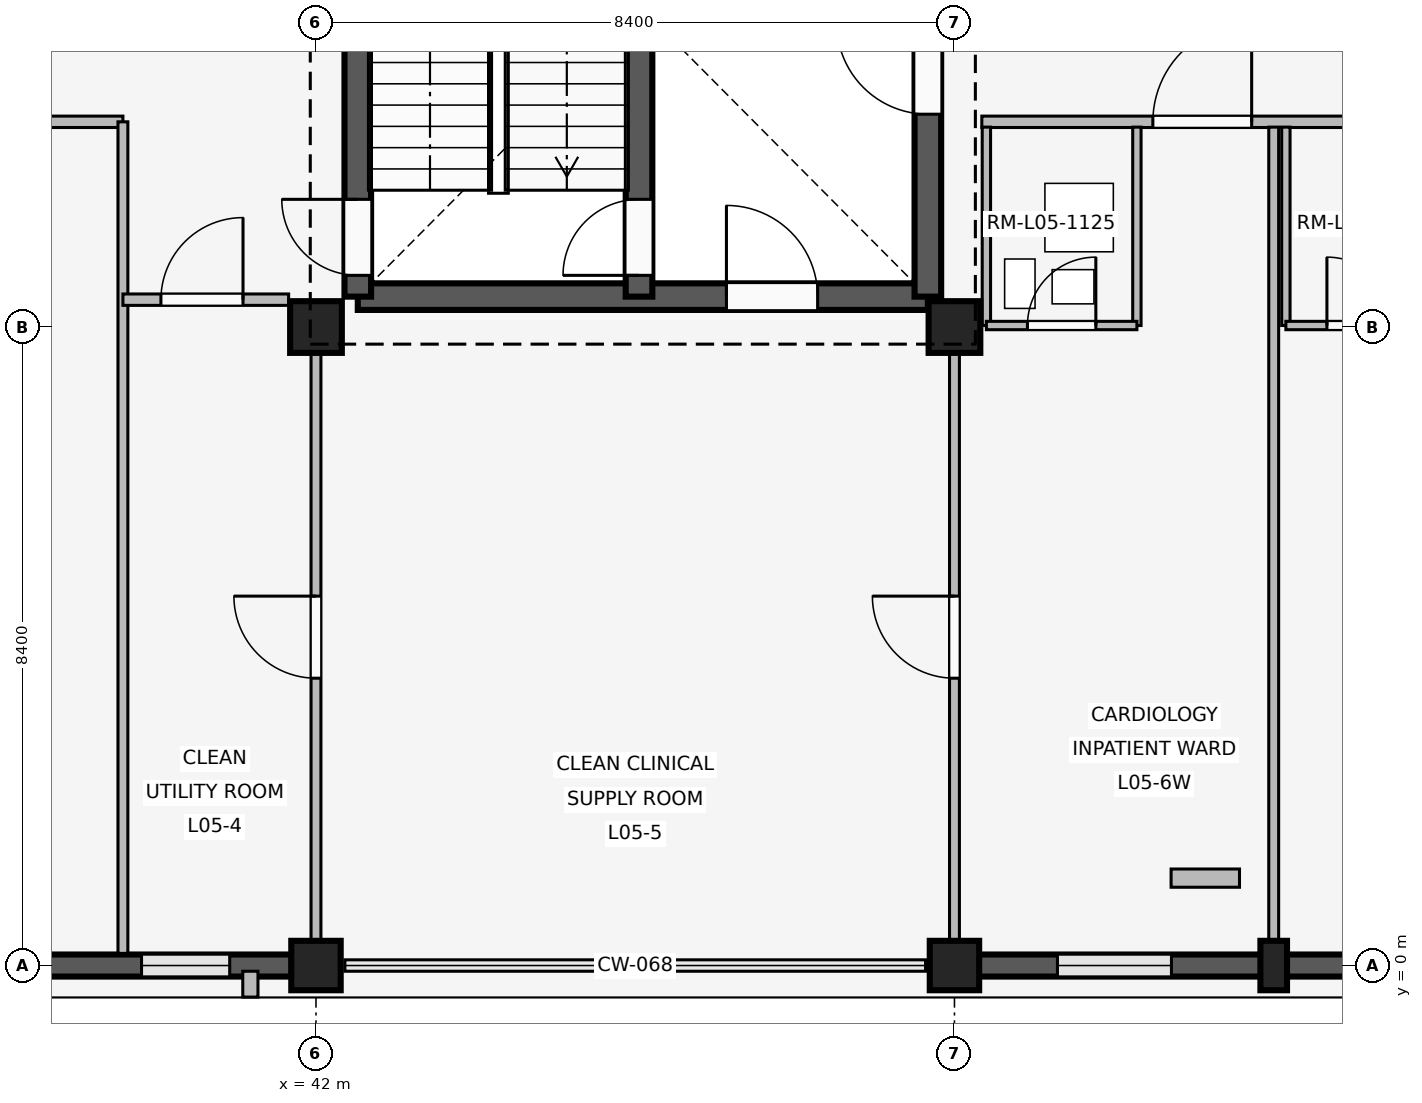
"""IFC4 building model, lengths in metres.
Left out: names, types, materials, properties, quantities, classifications, styles, units other than length and angle.
Written with IfcOpenShell. Run it as: python <this file> out.ifc"""

import sys

from ifc_helpers import new_model, si_unit, direction, frame, frame_2d, origin, origin_2d, place, context, subcontext, project, spatial, rectangle, extrude, element, fill, save


model = new_model("IFC4")
c1 = context("Model", 3, precision=1e-05, world=origin(), true_north=direction((0.0, 1.0)))
c2 = subcontext(c1, "Body", "Model", "MODEL_VIEW")
j1 = project(units=[si_unit("LENGTHUNIT", "METRE"), si_unit("PLANEANGLEUNIT", "RADIAN")], contexts=[c1])
p1 = place(None, origin())
s1 = spatial("IfcSite", under=j1, at=p1, CompositionType="ELEMENT")
p2 = place(p1, origin())
s2 = spatial("IfcBuilding", under=s1, at=p2, CompositionType="ELEMENT")
p3 = place(p2, frame((0.0, 0.0, 20.4)))
s3 = spatial("IfcBuildingStorey", under=s2, at=p3, CompositionType="ELEMENT", Elevation=20.4)
p4 = place(p3, frame((42.0, 0.0, 0.0), z_axis=(0.0, 0.0, 1.0), x_axis=(1.0, 0.0, 0.0)))
e1 = element("IfcColumn", 1, at=p4, inside=s3, PredefinedType="COLUMN", context=c2, shape_type="SweptSolid", body=[
    extrude(rectangle(XDim=0.65, YDim=0.65, at=origin_2d()), origin(), (0.0, 0.0, 1.0), 4.2),
])
p5 = place(p3, frame((42.0, 8.4, 0.0), z_axis=(0.0, 0.0, 1.0), x_axis=(1.0, 0.0, 0.0)))
e2 = element("IfcColumn", 2, at=p5, inside=s3, PredefinedType="COLUMN", context=c2, shape_type="SweptSolid", body=[
    extrude(rectangle(XDim=0.68, YDim=0.68, at=origin_2d()), origin(), (0.0, 0.0, 1.0), 4.2),
])
p6 = place(p3, frame((50.4, 0.0, 0.0), z_axis=(0.0, 0.0, 1.0), x_axis=(1.0, 0.0, 0.0)))
e3 = element("IfcColumn", 3, at=p6, inside=s3, PredefinedType="COLUMN", context=c2, shape_type="SweptSolid", body=[
    extrude(rectangle(XDim=0.65, YDim=0.65, at=origin_2d()), origin(), (0.0, 0.0, 1.0), 4.2),
])
p7 = place(p3, frame((50.4, 8.4, 0.0), z_axis=(0.0, 0.0, 1.0), x_axis=(1.0, 0.0, 0.0)))
e4 = element("IfcColumn", 4, at=p7, inside=s3, PredefinedType="COLUMN", context=c2, shape_type="SweptSolid", body=[
    extrude(rectangle(XDim=0.68, YDim=0.68, at=origin_2d()), origin(), (0.0, 0.0, 1.0), 4.2),
])
p8 = place(p3, frame((54.6, 0.0, 0.0), z_axis=(0.0, 0.0, 1.0), x_axis=(1.0, 0.0, 0.0)))
e5 = element("IfcColumn", 5, at=p8, inside=s3, PredefinedType="PILASTER", context=c2, shape_type="SweptSolid", body=[
    extrude(rectangle(XDim=0.35, YDim=0.65, at=origin_2d()), origin(), (0.0, 0.0, 1.0), 4.2),
])
p9 = place(p3, frame((41.68, 0.0, 0.0), z_axis=(0.0, 0.0, 1.0), x_axis=(-1.0, 0.0, 0.0)))
e6 = element("IfcWall", 6, at=p9, inside=s3, PredefinedType="SOLIDWALL", context=c2, shape_type="SweptSolid", body=[
    extrude(rectangle(XDim=7.76, YDim=0.29, at=frame_2d((3.88, 0.0))), origin(), (0.0, 0.0, 1.0), 3.34),
])
p10 = place(p9, frame((0.815, 0.0, 0.85)))
e7 = element("IfcOpeningElement", 7, at=p10, cuts=e6, PredefinedType="OPENING", context=c2, shape_type="SweptSolid", body=[
    extrude(rectangle(XDim=1.16, YDim=1.48, at=frame_2d((0.58, 0.74))), frame((0.0, 0.155, 0.0), z_axis=(0.0, -1.0, 0.0), x_axis=(1.0, 0.0, 0.0)), (0.0, 0.0, 1.0), 0.31),
])
p11 = place(p9, frame((5.395, 0.0, 0.85)))
e8 = element("IfcOpeningElement", 8, at=p11, cuts=e6, PredefinedType="OPENING", context=c2, shape_type="SweptSolid", body=[
    extrude(rectangle(XDim=1.16, YDim=1.48, at=frame_2d((0.58, 0.74))), frame((0.0, 0.155, 0.0), z_axis=(0.0, -1.0, 0.0), x_axis=(1.0, 0.0, 0.0)), (0.0, 0.0, 1.0), 0.31),
])
p12 = place(p3, frame((41.137, -0.075, 0.0), z_axis=(0.0, 0.0, 1.0), x_axis=(0.0, -1.0, 0.0)))
e9 = element("IfcWall", 9, at=p12, inside=s3, PredefinedType="ELEMENTEDWALL", context=c2, shape_type="SweptSolid", body=[
    extrude(rectangle(XDim=0.34, YDim=0.2, at=frame_2d((0.17, 0.0))), origin(), (0.0, 0.0, 1.0), 3.32),
])
p13 = place(p3, frame((58.48, 0.0, 0.0), z_axis=(0.0, 0.0, 1.0), x_axis=(-1.0, 0.0, 0.0)))
e10 = element("IfcWall", 10, at=p13, inside=s3, PredefinedType="SOLIDWALL", context=c2, shape_type="SweptSolid", body=[
    extrude(rectangle(XDim=7.76, YDim=0.29, at=frame_2d((3.88, 0.0))), origin(), (0.0, 0.0, 1.0), 3.34),
])
p14 = place(p13, frame((1.035, 0.0, 0.85)))
e11 = element("IfcOpeningElement", 11, at=p14, cuts=e10, PredefinedType="OPENING", context=c2, shape_type="SweptSolid", body=[
    extrude(rectangle(XDim=1.5, YDim=1.55, at=frame_2d((0.75, 0.775))), frame((0.0, 0.155, 0.0), z_axis=(0.0, -1.0, 0.0), x_axis=(1.0, 0.0, 0.0)), (0.0, 0.0, 1.0), 0.31),
])
p15 = place(p13, frame((5.225, 0.0, 0.85)))
e12 = element("IfcOpeningElement", 12, at=p15, cuts=e10, PredefinedType="OPENING", context=c2, shape_type="SweptSolid", body=[
    extrude(rectangle(XDim=1.5, YDim=1.55, at=frame_2d((0.75, 0.775))), frame((0.0, 0.155, 0.0), z_axis=(0.0, -1.0, 0.0), x_axis=(1.0, 0.0, 0.0)), (0.0, 0.0, 1.0), 0.31),
])
p16 = place(p3, frame((42.55, 8.8, 0.0), z_axis=(0.0, 0.0, 1.0), x_axis=(1.0, 0.0, 0.0)))
e13 = element("IfcWall", 13, at=p16, inside=s3, PredefinedType="SHEAR", context=c2, shape_type="SweptSolid", body=[
    extrude(rectangle(XDim=7.5, YDim=0.35, at=frame_2d((3.75, 0.0))), origin(), (0.0, 0.0, 1.0), 3.92),
])
p17 = place(p16, frame((4.85, 0.0, 0.0)))
e14 = element("IfcOpeningElement", 14, at=p17, cuts=e13, PredefinedType="OPENING", context=c2, shape_type="SweptSolid", body=[
    extrude(rectangle(XDim=1.2, YDim=2.2, at=frame_2d((0.6, 1.1))), frame((0.0, 0.185, 0.0), z_axis=(0.0, -1.0, 0.0), x_axis=(1.0, 0.0, 0.0)), (0.0, 0.0, 1.0), 0.37),
])
p18 = place(p3, frame((42.55, 8.8, 0.0), z_axis=(0.0, 0.0, 1.0), x_axis=(0.0, 1.0, 0.0)))
e15 = element("IfcWall", 15, at=p18, inside=s3, PredefinedType="SHEAR", context=c2, shape_type="SweptSolid", body=[
    extrude(rectangle(XDim=7.55, YDim=0.35, at=frame_2d((3.775, 0.0))), origin(), (0.0, 0.0, 1.0), 3.92),
])
p19 = place(p18, frame((0.28, 0.0, 0.0)))
e16 = element("IfcOpeningElement", 16, at=p19, cuts=e15, PredefinedType="OPENING", context=c2, shape_type="SweptSolid", body=[
    extrude(rectangle(XDim=1.0, YDim=2.15, at=frame_2d((0.5, 1.075))), frame((0.0, 0.185, 0.0), z_axis=(0.0, -1.0, 0.0), x_axis=(1.0, 0.0, 0.0)), (0.0, 0.0, 1.0), 0.37),
])
p20 = place(p3, frame((50.05, 8.8, 0.0), z_axis=(0.0, 0.0, 1.0), x_axis=(0.0, 1.0, 0.0)))
e17 = element("IfcWall", 17, at=p20, inside=s3, PredefinedType="SHEAR", context=c2, shape_type="SweptSolid", body=[
    extrude(rectangle(XDim=7.55, YDim=0.35, at=frame_2d((3.775, 0.0))), origin(), (0.0, 0.0, 1.0), 3.92),
])
p21 = place(p20, frame((2.4, 0.0, 0.0)))
e18 = element("IfcOpeningElement", 18, at=p21, cuts=e17, PredefinedType="OPENING", context=c2, shape_type="SweptSolid", body=[
    extrude(rectangle(XDim=1.2, YDim=2.2, at=frame_2d((0.6, 1.1))), frame((0.0, 0.185, 0.0), z_axis=(0.0, -1.0, 0.0), x_axis=(1.0, 0.0, 0.0)), (0.0, 0.0, 1.0), 0.37),
])
p22 = place(p3, frame((46.25, 8.8, 0.0), z_axis=(0.0, 0.0, 1.0), x_axis=(0.0, 1.0, 0.0)))
e19 = element("IfcWall", 19, at=p22, inside=s3, PredefinedType="SHEAR", context=c2, shape_type="SweptSolid", body=[
    extrude(rectangle(XDim=7.55, YDim=0.35, at=frame_2d((3.775, 0.0))), origin(), (0.0, 0.0, 1.0), 3.92),
])
p23 = place(p22, frame((0.28, 0.0, 0.0)))
e20 = element("IfcOpeningElement", 20, at=p23, cuts=e19, PredefinedType="OPENING", context=c2, shape_type="SweptSolid", body=[
    extrude(rectangle(XDim=1.0, YDim=2.15, at=frame_2d((0.5, 1.075))), frame((0.0, 0.185, 0.0), z_axis=(0.0, -1.0, 0.0), x_axis=(1.0, 0.0, 0.0)), (0.0, 0.0, 1.0), 0.37),
])
p24 = place(p3, frame((33.68, 11.1, 0.0), z_axis=(0.0, 0.0, 1.0), x_axis=(1.0, 0.0, 0.0)))
e21 = element("IfcWall", 21, at=p24, inside=s3, PredefinedType="PARTITIONING", context=c2, shape_type="SweptSolid", body=[
    extrude(rectangle(XDim=5.78, YDim=0.15, at=frame_2d((2.89, 0.0))), origin(), (0.0, 0.0, 1.0), 3.32),
])
p25 = place(p24, frame((2.38, 0.0, 0.0)))
e22 = element("IfcOpeningElement", 22, at=p25, cuts=e21, PredefinedType="OPENING", context=c2, shape_type="SweptSolid", body=[
    extrude(rectangle(XDim=1.25, YDim=2.2, at=frame_2d((0.625, 1.1))), frame((0.0, 0.085, 0.0), z_axis=(0.0, -1.0, 0.0), x_axis=(1.0, 0.0, 0.0)), (0.0, 0.0, 1.0), 0.17),
])
p26 = place(p3, frame((39.46, 0.16, 0.0), z_axis=(0.0, 0.0, 1.0), x_axis=(0.0, 1.0, 0.0)))
e23 = element("IfcWall", 23, at=p26, inside=s3, PredefinedType="PARTITIONING", context=c2, shape_type="SweptSolid", body=[
    extrude(rectangle(XDim=10.94, YDim=0.13, at=frame_2d((5.47, 0.0))), origin(), (0.0, 0.0, 1.0), 3.32),
])
p27 = place(p3, frame((39.46, 8.76, 0.0), z_axis=(0.0, 0.0, 1.0), x_axis=(1.0, 0.0, 0.0)))
e24 = element("IfcWall", 24, at=p27, inside=s3, PredefinedType="PARTITIONING", context=c2, shape_type="SweptSolid", body=[
    extrude(rectangle(XDim=2.18, YDim=0.15, at=frame_2d((1.09, 0.0))), origin(), (0.0, 0.0, 1.0), 3.32),
])
p28 = place(p27, frame((0.5, 0.0, 0.0)))
e25 = element("IfcOpeningElement", 25, at=p28, cuts=e24, PredefinedType="OPENING", context=c2, shape_type="SweptSolid", body=[
    extrude(rectangle(XDim=1.08, YDim=2.15, at=frame_2d((0.54, 1.075))), frame((0.0, 0.085, 0.0), z_axis=(0.0, -1.0, 0.0), x_axis=(1.0, 0.0, 0.0)), (0.0, 0.0, 1.0), 0.17),
])
p29 = place(p3, frame((42.0, 0.14, 0.0), z_axis=(0.0, 0.0, 1.0), x_axis=(0.0, 1.0, 0.0)))
e26 = element("IfcWall", 26, at=p29, inside=s3, PredefinedType="PARTITIONING", context=c2, shape_type="SweptSolid", body=[
    extrude(rectangle(XDim=8.21, YDim=0.13, at=frame_2d((4.105, 0.0))), origin(), (0.0, 0.0, 1.0), 3.32),
])
p30 = place(p29, frame((3.64, 0.0, 0.0)))
e27 = element("IfcOpeningElement", 27, at=p30, cuts=e26, PredefinedType="OPENING", context=c2, shape_type="SweptSolid", body=[
    extrude(rectangle(XDim=1.08, YDim=2.15, at=frame_2d((0.54, 1.075))), frame((0.0, 0.075, 0.0), z_axis=(0.0, -1.0, 0.0), x_axis=(1.0, 0.0, 0.0)), (0.0, 0.0, 1.0), 0.15),
])
p31 = place(p3, frame((50.4, 0.14, 0.0), z_axis=(0.0, 0.0, 1.0), x_axis=(0.0, 1.0, 0.0)))
e28 = element("IfcWall", 28, at=p31, inside=s3, PredefinedType="PARTITIONING", context=c2, shape_type="SweptSolid", body=[
    extrude(rectangle(XDim=8.21, YDim=0.13, at=frame_2d((4.105, 0.0))), origin(), (0.0, 0.0, 1.0), 3.32),
])
p32 = place(p31, frame((3.64, 0.0, 0.0)))
e29 = element("IfcOpeningElement", 29, at=p32, cuts=e28, PredefinedType="OPENING", context=c2, shape_type="SweptSolid", body=[
    extrude(rectangle(XDim=1.08, YDim=2.15, at=frame_2d((0.54, 1.075))), frame((0.0, 0.075, 0.0), z_axis=(0.0, -1.0, 0.0), x_axis=(1.0, 0.0, 0.0)), (0.0, 0.0, 1.0), 0.15),
])
p33 = place(p3, frame((50.76, 11.1, 0.0), z_axis=(0.0, 0.0, 1.0), x_axis=(1.0, 0.0, 0.0)))
e30 = element("IfcWall", 30, at=p33, inside=s3, PredefinedType="PARTITIONING", context=c2, shape_type="SweptSolid", body=[
    extrude(rectangle(XDim=7.96, YDim=0.15, at=frame_2d((3.98, 0.0))), origin(), (0.0, 0.0, 1.0), 3.32),
])
p34 = place(p33, frame((2.25, 0.0, 0.0)))
e31 = element("IfcOpeningElement", 31, at=p34, cuts=e30, PredefinedType="OPENING", context=c2, shape_type="SweptSolid", body=[
    extrude(rectangle(XDim=1.3, YDim=2.25, at=frame_2d((0.65, 1.125))), frame((0.0, 0.085, 0.0), z_axis=(0.0, -1.0, 0.0), x_axis=(1.0, 0.0, 0.0)), (0.0, 0.0, 1.0), 0.17),
])
p35 = place(p33, frame((5.95, 0.0, 0.0)))
e32 = element("IfcOpeningElement", 32, at=p35, cuts=e30, PredefinedType="OPENING", context=c2, shape_type="SweptSolid", body=[
    extrude(rectangle(XDim=1.3, YDim=2.25, at=frame_2d((0.65, 1.125))), frame((0.0, 0.085, 0.0), z_axis=(0.0, -1.0, 0.0), x_axis=(1.0, 0.0, 0.0)), (0.0, 0.0, 1.0), 0.17),
])
p36 = place(p3, frame((54.6, 0.1, 0.0), z_axis=(0.0, 0.0, 1.0), x_axis=(0.0, 1.0, 0.0)))
e33 = element("IfcWall", 33, at=p36, inside=s3, PredefinedType="PARTITIONING", context=c2, shape_type="SweptSolid", body=[
    extrude(rectangle(XDim=10.93, YDim=0.13, at=frame_2d((5.465, 0.0))), origin(), (0.0, 0.0, 1.0), 3.32),
])
for number, where, z_axis, x_axis in (
    (34, (50.82, 8.42, 0.0), (0.0, 0.0, 1.0), (0.0, 1.0, 0.0)),
    (35, (52.8, 8.42, 0.0), (0.0, 0.0, 1.0), (0.0, 1.0, 0.0)),
):
    element("IfcWall", number, at=place(p3, frame(where, z_axis=z_axis, x_axis=x_axis)), inside=s3, PredefinedType="PARTITIONING", context=c2, shape_type="SweptSolid", body=[
        extrude(rectangle(XDim=2.61, YDim=0.11, at=frame_2d((1.305, 0.0))), origin(), (0.0, 0.0, 1.0), 3.32),
    ])
p37 = place(p3, frame((50.82, 8.42, 0.0), z_axis=(0.0, 0.0, 1.0), x_axis=(1.0, 0.0, 0.0)))
e36 = element("IfcWall", 36, at=p37, inside=s3, PredefinedType="PARTITIONING", context=c2, shape_type="SweptSolid", body=[
    extrude(rectangle(XDim=1.98, YDim=0.11, at=frame_2d((0.99, 0.0))), origin(), (0.0, 0.0, 1.0), 3.32),
])
p38 = place(p37, frame((0.54, 0.0, 0.0)))
e37 = element("IfcOpeningElement", 37, at=p38, cuts=e36, PredefinedType="OPENING", context=c2, shape_type="SweptSolid", body=[
    extrude(rectangle(XDim=0.9, YDim=2.1, at=frame_2d((0.45, 1.05))), frame((0.0, 0.065, 0.0), z_axis=(0.0, -1.0, 0.0), x_axis=(1.0, 0.0, 0.0)), (0.0, 0.0, 1.0), 0.13),
])
p39 = place(p3, frame((54.76, 8.42, 0.0), z_axis=(0.0, 0.0, 1.0), x_axis=(0.0, 1.0, 0.0)))
e38 = element("IfcWall", 38, at=p39, inside=s3, PredefinedType="PARTITIONING", context=c2, shape_type="SweptSolid", body=[
    extrude(rectangle(XDim=2.61, YDim=0.11, at=frame_2d((1.305, 0.0))), origin(), (0.0, 0.0, 1.0), 3.32),
])
p40 = place(p3, frame((54.76, 8.42, 0.0), z_axis=(0.0, 0.0, 1.0), x_axis=(1.0, 0.0, 0.0)))
e39 = element("IfcWall", 39, at=p40, inside=s3, PredefinedType="PARTITIONING", context=c2, shape_type="SweptSolid", body=[
    extrude(rectangle(XDim=1.98, YDim=0.11, at=frame_2d((0.99, 0.0))), origin(), (0.0, 0.0, 1.0), 3.32),
])
p41 = place(p40, frame((0.54, 0.0, 0.0)))
e40 = element("IfcOpeningElement", 40, at=p41, cuts=e39, PredefinedType="OPENING", context=c2, shape_type="SweptSolid", body=[
    extrude(rectangle(XDim=0.9, YDim=2.1, at=frame_2d((0.45, 1.05))), frame((0.0, 0.065, 0.0), z_axis=(0.0, -1.0, 0.0), x_axis=(1.0, 0.0, 0.0)), (0.0, 0.0, 1.0), 0.13),
])
p42 = place(p3, frame((53.25, 1.15, 0.0), z_axis=(0.0, 0.0, 1.0), x_axis=(1.0, 0.0, 0.0)))
e41 = element("IfcWall", 41, at=p42, inside=s3, PredefinedType="PLUMBINGWALL", context=c2, shape_type="SweptSolid", body=[
    extrude(rectangle(XDim=0.9, YDim=0.24, at=frame_2d((0.45, 0.0))), origin(), (0.0, 0.0, 1.0), 3.32),
])
p43 = place(p10, origin())
e42 = element("IfcWindow", 42, at=p43, inside=s3, PartitioningType="SINGLE_PANEL", PredefinedType="WINDOW", context=c2, shape_type="SweptSolid", body=[
    extrude(rectangle(XDim=1.16, YDim=1.48, at=frame_2d((0.58, 0.74))), frame((0.0, 0.03, 0.0), z_axis=(0.0, -1.0, 0.0), x_axis=(1.0, 0.0, 0.0)), (0.0, 0.0, 1.0), 0.06),
])
fill(e7, e42)
p44 = place(p15, origin())
e43 = element("IfcWindow", 43, at=p44, inside=s3, PartitioningType="SINGLE_PANEL", PredefinedType="WINDOW", context=c2, shape_type="SweptSolid", body=[
    extrude(rectangle(XDim=1.5, YDim=1.55, at=frame_2d((0.75, 0.775))), frame((0.0, 0.03, 0.0), z_axis=(0.0, -1.0, 0.0), x_axis=(1.0, 0.0, 0.0)), (0.0, 0.0, 1.0), 0.06),
])
fill(e12, e43)
p45 = place(p21, origin())
e44 = element("IfcDoor", 44, at=p45, inside=s3, OperationType="SINGLE_SWING_RIGHT", PredefinedType="DOOR", context=c2, shape_type="SweptSolid", body=[
    extrude(rectangle(XDim=1.2, YDim=2.2, at=frame_2d((0.6, 1.1))), frame((0.0, 0.025, 0.0), z_axis=(0.0, -1.0, 0.0), x_axis=(1.0, 0.0, 0.0)), (0.0, 0.0, 1.0), 0.05),
])
fill(e18, e44)
p46 = place(p17, origin())
e45 = element("IfcDoor", 45, at=p46, inside=s3, OperationType="SINGLE_SWING_LEFT", PredefinedType="DOOR", context=c2, shape_type="SweptSolid", body=[
    extrude(rectangle(XDim=1.2, YDim=2.2, at=frame_2d((0.6, 1.1))), frame((0.0, 0.025, 0.0), z_axis=(0.0, -1.0, 0.0), x_axis=(1.0, 0.0, 0.0)), (0.0, 0.0, 1.0), 0.05),
])
fill(e14, e45)
p47 = place(p19, origin())
e46 = element("IfcDoor", 46, at=p47, inside=s3, OperationType="SINGLE_SWING_RIGHT", PredefinedType="DOOR", context=c2, shape_type="SweptSolid", body=[
    extrude(rectangle(XDim=1.0, YDim=2.15, at=frame_2d((0.5, 1.075))), frame((0.0, 0.025, 0.0), z_axis=(0.0, -1.0, 0.0), x_axis=(1.0, 0.0, 0.0)), (0.0, 0.0, 1.0), 0.05),
])
fill(e16, e46)
p48 = place(p23, origin())
e47 = element("IfcDoor", 47, at=p48, inside=s3, OperationType="SINGLE_SWING_LEFT", PredefinedType="DOOR", context=c2, shape_type="SweptSolid", body=[
    extrude(rectangle(XDim=1.0, YDim=2.15, at=frame_2d((0.5, 1.075))), frame((0.0, 0.025, 0.0), z_axis=(0.0, -1.0, 0.0), x_axis=(1.0, 0.0, 0.0)), (0.0, 0.0, 1.0), 0.05),
])
fill(e20, e47)
p49 = place(p28, origin())
e48 = element("IfcDoor", 48, at=p49, inside=s3, OperationType="SINGLE_SWING_RIGHT", PredefinedType="DOOR", context=c2, shape_type="SweptSolid", body=[
    extrude(rectangle(XDim=1.08, YDim=2.15, at=frame_2d((0.54, 1.075))), frame((0.0, 0.025, 0.0), z_axis=(0.0, -1.0, 0.0), x_axis=(1.0, 0.0, 0.0)), (0.0, 0.0, 1.0), 0.05),
])
fill(e25, e48)
p50 = place(p30, origin())
e49 = element("IfcDoor", 49, at=p50, inside=s3, OperationType="SINGLE_SWING_RIGHT", PredefinedType="DOOR", context=c2, shape_type="SweptSolid", body=[
    extrude(rectangle(XDim=1.08, YDim=2.15, at=frame_2d((0.54, 1.075))), frame((0.0, 0.025, 0.0), z_axis=(0.0, -1.0, 0.0), x_axis=(1.0, 0.0, 0.0)), (0.0, 0.0, 1.0), 0.05),
])
fill(e27, e49)
p51 = place(p32, origin())
e50 = element("IfcDoor", 50, at=p51, inside=s3, OperationType="SINGLE_SWING_RIGHT", PredefinedType="DOOR", context=c2, shape_type="SweptSolid", body=[
    extrude(rectangle(XDim=1.08, YDim=2.15, at=frame_2d((0.54, 1.075))), frame((0.0, 0.025, 0.0), z_axis=(0.0, -1.0, 0.0), x_axis=(1.0, 0.0, 0.0)), (0.0, 0.0, 1.0), 0.05),
])
fill(e29, e50)
p52 = place(p34, origin())
e51 = element("IfcDoor", 51, at=p52, inside=s3, OperationType="SINGLE_SWING_RIGHT", PredefinedType="DOOR", context=c2, shape_type="SweptSolid", body=[
    extrude(rectangle(XDim=1.3, YDim=2.25, at=frame_2d((0.65, 1.125))), frame((0.0, 0.025, 0.0), z_axis=(0.0, -1.0, 0.0), x_axis=(1.0, 0.0, 0.0)), (0.0, 0.0, 1.0), 0.05),
])
fill(e31, e51)
p53 = place(p38, origin())
e52 = element("IfcDoor", 52, at=p53, inside=s3, OperationType="SINGLE_SWING_RIGHT", PredefinedType="DOOR", context=c2, shape_type="SweptSolid", body=[
    extrude(rectangle(XDim=0.9, YDim=2.1, at=frame_2d((0.45, 1.05))), frame((0.0, 0.025, 0.0), z_axis=(0.0, -1.0, 0.0), x_axis=(1.0, 0.0, 0.0)), (0.0, 0.0, 1.0), 0.05),
])
fill(e37, e52)
p54 = place(p41, origin())
e53 = element("IfcDoor", 53, at=p54, inside=s3, OperationType="SINGLE_SWING_LEFT", PredefinedType="DOOR", context=c2, shape_type="SweptSolid", body=[
    extrude(rectangle(XDim=0.9, YDim=2.1, at=frame_2d((0.45, 1.05))), frame((0.0, 0.025, 0.0), z_axis=(0.0, -1.0, 0.0), x_axis=(1.0, 0.0, 0.0)), (0.0, 0.0, 1.0), 0.05),
])
fill(e40, e53)
save(model, sys.argv[1])
